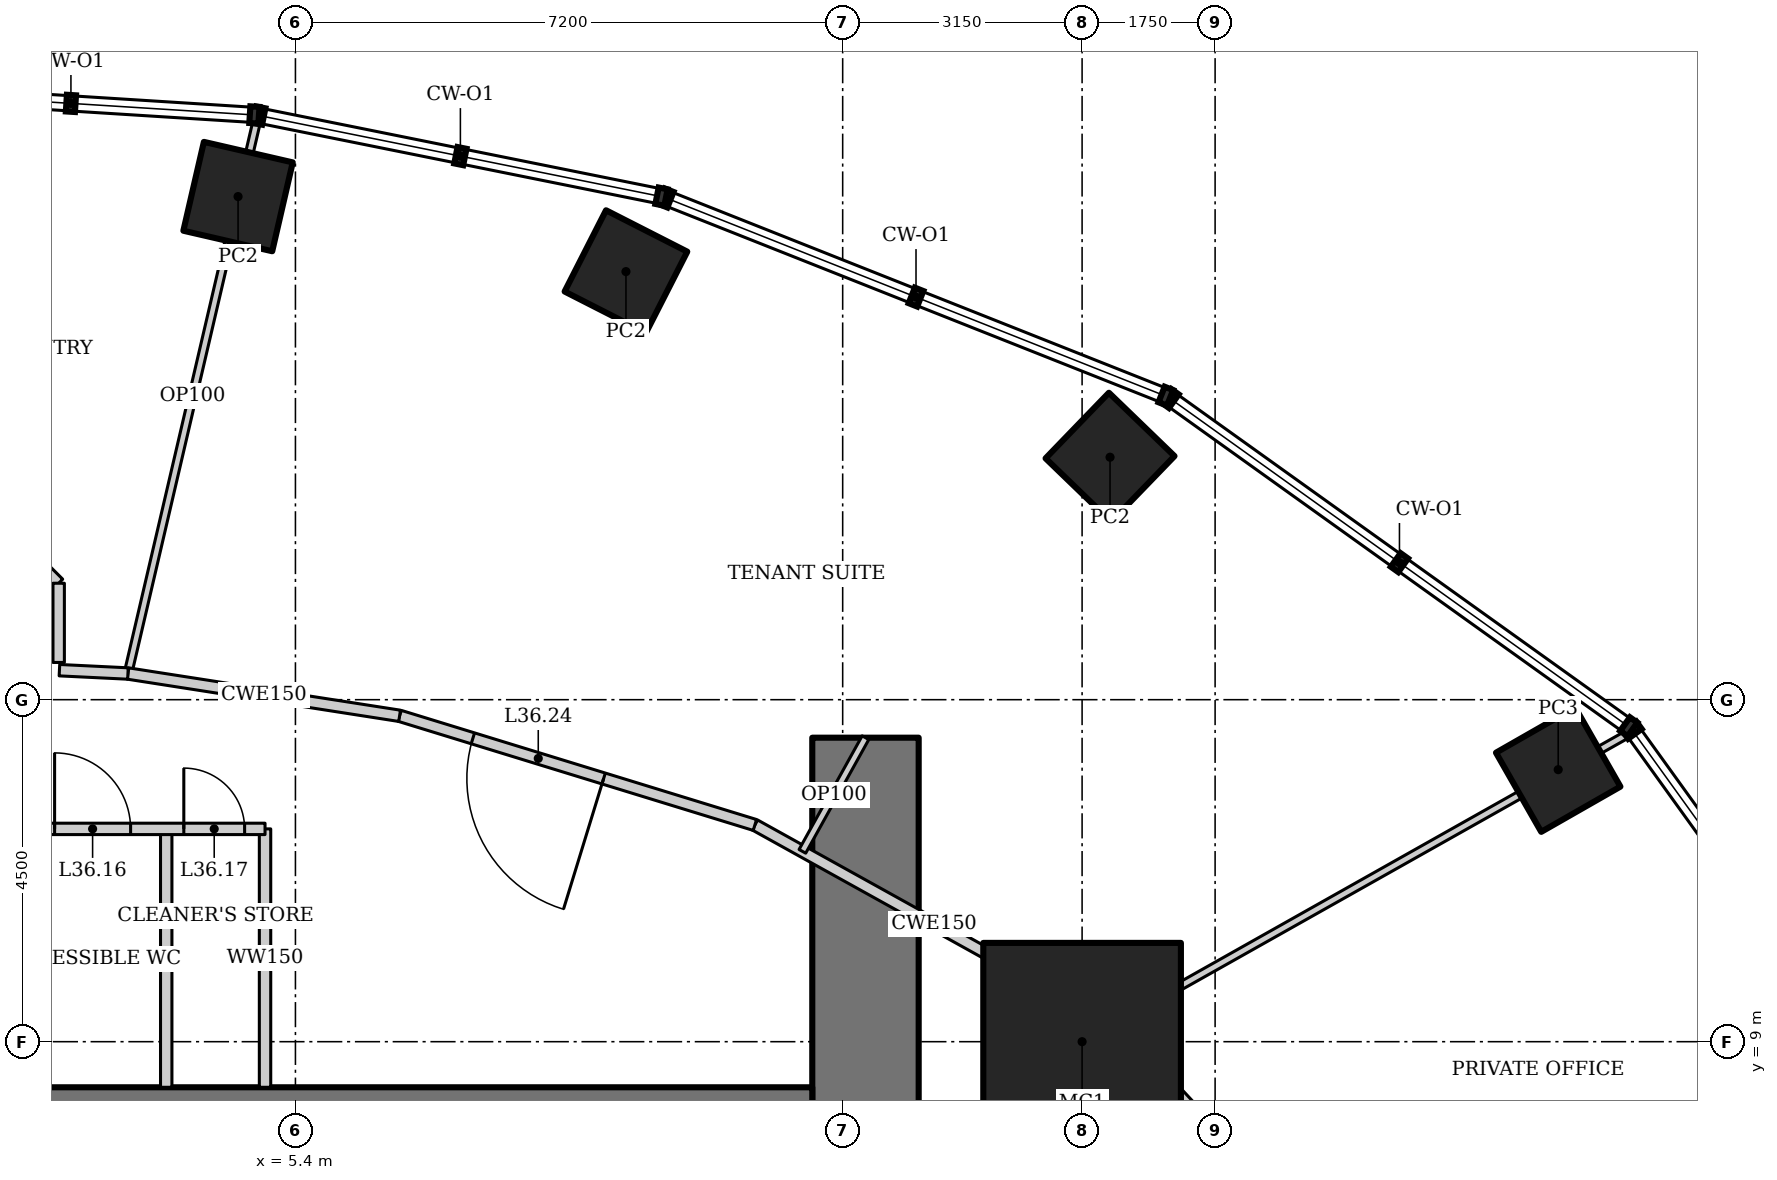
"""IFC4 building model, lengths in metres.
Left out: names, types, materials, properties, quantities, classifications, styles, units other than length and angle.
Written with IfcOpenShell. Run it as: python <this file> out.ifc"""

import sys

from ifc_helpers import new_model, si_unit, direction, frame, frame_2d, origin, origin_2d, place, context, subcontext, project, spatial, rectangle, hollow_rectangle, extrude, element, fill, save


model = new_model("IFC4")
c1 = context("Model", 3, precision=1e-05, world=origin(), true_north=direction((0.0, 1.0)))
c2 = subcontext(c1, "Body", "Model", "MODEL_VIEW")
j1 = project(units=[si_unit("LENGTHUNIT", "METRE"), si_unit("PLANEANGLEUNIT", "RADIAN")], contexts=[c1])
p1 = place(None, origin())
s1 = spatial("IfcSite", under=j1, at=p1, CompositionType="ELEMENT")
p2 = place(p1, origin())
s2 = spatial("IfcBuilding", under=s1, at=p2, CompositionType="ELEMENT")
p3 = place(p2, frame((0.0, 0.0, 155.2)))
s3 = spatial("IfcBuildingStorey", under=s2, at=p3, CompositionType="ELEMENT", Elevation=155.2)
p4 = place(p3, frame((15.75, 9.0, 0.0), z_axis=(0.0, 0.0, 1.0), x_axis=(1.0, 0.0, 0.0)))
e1 = element("IfcColumn", 1, at=p4, inside=s3, PredefinedType="COLUMN", context=c2, shape_type="SweptSolid", body=[
    extrude(hollow_rectangle(XDim=2.6, YDim=2.6, WallThickness=0.13, at=origin_2d()), origin(), (0.0, 0.0, 1.0), 4.2),
])
p5 = place(p3, frame((22.014, 12.579, 0.0), z_axis=(0.0, 0.0, 1.0), x_axis=(0.86824298017, 0.496139221777, 0.0)))
e2 = element("IfcColumn", 2, at=p5, inside=s3, PredefinedType="COLUMN", context=c2, shape_type="SweptSolid", body=[
    extrude(hollow_rectangle(XDim=1.2, YDim=1.2, WallThickness=0.12, at=origin_2d()), origin(), (0.0, 0.0, 1.0), 4.2),
])
for number, where, z_axis, x_axis in (
    (3, (16.118, 16.69, 0.0), (0.0, 0.0, 1.0), (0.695, 0.719, 0.0)),
    (4, (9.749, 19.133, 0.0), (0.0, 0.0, 1.0), (0.454, 0.891, 0.0)),
    (5, (4.645, 20.12, 0.0), (0.0, 0.0, 1.0), (0.225, 0.974, 0.0)),
):
    element("IfcColumn", number, at=place(p3, frame(where, z_axis=z_axis, x_axis=x_axis)), inside=s3, PredefinedType="COLUMN", context=c2, shape_type="SweptSolid", body=[
        extrude(hollow_rectangle(XDim=1.2, YDim=1.2, WallThickness=0.1, at=origin_2d()), origin(), (0.0, 0.0, 1.0), 4.2),
    ])
p6 = place(p3, frame((12.9, -13.0, 0.0), z_axis=(0.0, 0.0, 1.0), x_axis=(0.0, 1.0, 0.0)))
e6 = element("IfcWall", 6, at=p6, inside=s3, PredefinedType="SHEAR", context=c2, shape_type="SweptSolid", body=[
    extrude(rectangle(XDim=26.0, YDim=1.4, at=frame_2d((13.0, 0.0))), origin(), (0.0, 0.0, 1.0), 4.2),
])
p7 = place(p6, frame((12.1, 0.0, 0.0)))
e7 = element("IfcOpeningElement", 7, at=p7, cuts=e6, PredefinedType="OPENING", context=c2, shape_type="SweptSolid", body=[
    extrude(rectangle(XDim=1.8, YDim=2.1, at=frame_2d((0.9, 1.05))), frame((0.0, 0.71, 0.0), z_axis=(0.0, -1.0, 0.0), x_axis=(1.0, 0.0, 0.0)), (0.0, 0.0, 1.0), 1.42),
])
p8 = place(p3, frame((12.2, 7.6, 0.0), z_axis=(0.0, 0.0, 1.0), x_axis=(-1.0, 0.0, 0.0)))
e8 = element("IfcWall", 8, at=p8, inside=s3, PredefinedType="SHEAR", context=c2, shape_type="SweptSolid", body=[
    extrude(rectangle(XDim=24.4, YDim=1.6, at=frame_2d((12.2, 0.0))), origin(), (0.0, 0.0, 1.0), 4.2),
])
p9 = place(p3, frame((22.949, 13.059, 0.0), z_axis=(0.0, 0.0, 1.0), x_axis=(-0.871274989434, -0.490795163777, 0.0)))
e9 = element("IfcWall", 9, at=p9, inside=s3, PredefinedType="PARTITIONING", context=c2, shape_type="SweptSolid", body=[
    extrude(rectangle(XDim=7.792, YDim=0.1, at=frame_2d((3.896, 0.0))), origin(), (0.0, 0.0, 1.0), 3.451),
])
p10 = place(p3, frame((4.897, 21.135, 0.0), z_axis=(0.0, 0.0, 1.0), x_axis=(-0.227181159974, -0.973852514785, 0.0)))
e10 = element("IfcWall", 10, at=p10, inside=s3, PredefinedType="PARTITIONING", context=c2, shape_type="SweptSolid", body=[
    extrude(rectangle(XDim=7.486, YDim=0.1, at=frame_2d((3.743, 0.0))), origin(), (0.0, 0.0, 1.0), 3.293),
])
p11 = place(p3, frame((20.078, 5.006, 0.0), z_axis=(0.0, 0.0, 1.0), x_axis=(-0.679724658223, 0.733467374191, 0.0)))
e11 = element("IfcWall", 11, at=p11, inside=s3, PredefinedType="PARTITIONING", context=c2, shape_type="SweptSolid", body=[
    extrude(rectangle(XDim=5.765, YDim=0.15, at=frame_2d((2.882, 0.0))), origin(), (0.0, 0.0, 1.0), 4.05),
])
p12 = place(p11, frame((0.15, 0.0, 0.0)))
e12 = element("IfcOpeningElement", 12, at=p12, cuts=e11, PredefinedType="OPENING", context=c2, shape_type="SweptSolid", body=[
    extrude(rectangle(XDim=0.9, YDim=2.1, at=frame_2d((0.45, 1.05))), frame((0.0, 0.085, 0.0), z_axis=(0.0, -1.0, 0.0), x_axis=(1.0, 0.0, 0.0)), (0.0, 0.0, 1.0), 0.17),
])
p13 = place(p3, frame((16.16, 9.234, 0.0), z_axis=(0.0, 0.0, 1.0), x_axis=(-0.87433873028, 0.485316169865, 0.0)))
e13 = element("IfcWall", 13, at=p13, inside=s3, PredefinedType="PARTITIONING", context=c2, shape_type="SweptSolid", body=[
    extrude(rectangle(XDim=5.393, YDim=0.15, at=frame_2d((2.696, 0.0))), origin(), (0.0, 0.0, 1.0), 4.05),
])
p14 = place(p3, frame((11.445, 11.852, 0.0), z_axis=(0.0, 0.0, 1.0), x_axis=(-0.955892284323, 0.293717450573, 0.0)))
e14 = element("IfcWall", 14, at=p14, inside=s3, PredefinedType="PARTITIONING", context=c2, shape_type="SweptSolid", body=[
    extrude(rectangle(XDim=4.89, YDim=0.15, at=frame_2d((2.445, 0.0))), origin(), (0.0, 0.0, 1.0), 4.05),
])
p15 = place(p14, frame((2.082, 0.0, 0.0)))
e15 = element("IfcOpeningElement", 15, at=p15, cuts=e14, PredefinedType="OPENING", context=c2, shape_type="SweptSolid", body=[
    extrude(rectangle(XDim=1.8, YDim=2.1, at=frame_2d((0.9, 1.05))), frame((0.0, 0.085, 0.0), z_axis=(0.0, -1.0, 0.0), x_axis=(1.0, 0.0, 0.0)), (0.0, 0.0, 1.0), 0.17),
])
p16 = place(p3, frame((6.771, 13.288, 0.0), z_axis=(0.0, 0.0, 1.0), x_axis=(-0.98808911792, 0.153882731479, 0.0)))
e16 = element("IfcWall", 16, at=p16, inside=s3, PredefinedType="PARTITIONING", context=c2, shape_type="SweptSolid", body=[
    extrude(rectangle(XDim=3.617, YDim=0.15, at=frame_2d((1.809, 0.0))), origin(), (0.0, 0.0, 1.0), 4.05),
])
for number, where, z_axis, x_axis in (
    (17, (5.0, 8.4, 0.0), (0.0, 0.0, 1.0), (0.0, 1.0, 0.0)),
    (18, (3.7, 8.4, 0.0), (0.0, 0.0, 1.0), (0.0, 1.0, 0.0)),
):
    element("IfcWall", number, at=place(p3, frame(where, z_axis=z_axis, x_axis=x_axis)), inside=s3, PredefinedType="SOLIDWALL", context=c2, shape_type="SweptSolid", body=[
        extrude(rectangle(XDim=3.4, YDim=0.15, at=frame_2d((1.7, 0.0))), origin(), (0.0, 0.0, 1.0), 4.05),
    ])
p17 = place(p3, frame((12.9, 13.0, 0.0), z_axis=(0.0, 0.0, 1.0), x_axis=(-0.485339901234, -0.87432555737, 0.0)))
e19 = element("IfcWall", 19, at=p17, inside=s3, PredefinedType="PARTITIONING", context=c2, shape_type="SweptSolid", body=[
    extrude(rectangle(XDim=1.71, YDim=0.1, at=frame_2d((0.855, 0.0))), origin(), (0.0, 0.0, 1.0), 4.05),
])
p18 = place(p3, frame((3.196, 13.844, 0.0), z_axis=(0.0, 0.0, 1.0), x_axis=(-0.998826757305, 0.048426324366, 0.0)))
e20 = element("IfcWall", 20, at=p18, inside=s3, PredefinedType="PARTITIONING", context=c2, shape_type="SweptSolid", body=[
    extrude(rectangle(XDim=0.902, YDim=0.15, at=frame_2d((0.451, 0.0))), origin(), (0.0, 0.0, 1.0), 4.05),
])
p19 = place(p3, frame((2.131, 11.8, 0.0), z_axis=(0.0, 0.0, 1.0), x_axis=(1.0, 0.0, 0.0)))
e21 = element("IfcWall", 21, at=p19, inside=s3, PredefinedType="SOLIDWALL", context=c2, shape_type="SweptSolid", body=[
    extrude(rectangle(XDim=2.869, YDim=0.15, at=frame_2d((1.434, 0.0))), origin(), (0.0, 0.0, 1.0), 4.05),
])
p20 = place(p19, frame((0.1, 0.0, 0.0)))
e22 = element("IfcOpeningElement", 22, at=p20, cuts=e21, PredefinedType="OPENING", context=c2, shape_type="SweptSolid", body=[
    extrude(rectangle(XDim=1.0, YDim=2.1, at=frame_2d((0.5, 1.05))), frame((0.0, 0.085, 0.0), z_axis=(0.0, -1.0, 0.0), x_axis=(1.0, 0.0, 0.0)), (0.0, 0.0, 1.0), 0.17),
])
p21 = place(p19, frame((1.8, 0.0, 0.0)))
e23 = element("IfcOpeningElement", 23, at=p21, cuts=e21, PredefinedType="OPENING", context=c2, shape_type="SweptSolid", body=[
    extrude(rectangle(XDim=0.8, YDim=2.1, at=frame_2d((0.4, 1.05))), frame((0.0, 0.085, 0.0), z_axis=(0.0, -1.0, 0.0), x_axis=(1.0, 0.0, 0.0)), (0.0, 0.0, 1.0), 0.17),
])
p22 = place(p3, frame((1.532, 15.785, 0.0), z_axis=(0.0, 0.0, 1.0), x_axis=(0.707106781187, -0.707106781187, 0.0)))
e24 = element("IfcWall", 24, at=p22, inside=s3, PredefinedType="PARTITIONING", context=c2, shape_type="SweptSolid", body=[
    extrude(rectangle(XDim=1.064, YDim=0.15, at=frame_2d((0.532, 0.0))), origin(), (0.0, 0.0, 1.0), 4.05),
])
p23 = place(p3, frame((2.285, 15.032, 0.0), z_axis=(0.0, 0.0, 1.0), x_axis=(0.0, -1.0, 0.0)))
e25 = element("IfcWall", 25, at=p23, inside=s3, PredefinedType="PARTITIONING", context=c2, shape_type="SweptSolid", body=[
    extrude(rectangle(XDim=1.042, YDim=0.15, at=frame_2d((0.521, 0.0))), origin(), (0.0, 0.0, 1.0), 4.05),
])
p24 = place(p20, origin())
e26 = element("IfcDoor", 26, at=p24, inside=s3, OperationType="SINGLE_SWING_LEFT", PredefinedType="DOOR", context=c2, shape_type="SweptSolid", body=[
    extrude(rectangle(XDim=1.0, YDim=2.1, at=frame_2d((0.5, 1.05))), frame((0.0, 0.025, 0.0), z_axis=(0.0, -1.0, 0.0), x_axis=(1.0, 0.0, 0.0)), (0.0, 0.0, 1.0), 0.05),
])
fill(e22, e26)
p25 = place(p21, origin())
e27 = element("IfcDoor", 27, at=p25, inside=s3, OperationType="SINGLE_SWING_LEFT", PredefinedType="DOOR", context=c2, shape_type="SweptSolid", body=[
    extrude(rectangle(XDim=0.8, YDim=2.1, at=frame_2d((0.4, 1.05))), frame((0.0, 0.025, 0.0), z_axis=(0.0, -1.0, 0.0), x_axis=(1.0, 0.0, 0.0)), (0.0, 0.0, 1.0), 0.05),
])
fill(e23, e27)
p26 = place(p15, origin())
e28 = element("IfcDoor", 28, at=p26, inside=s3, OperationType="DOUBLE_DOOR_DOUBLE_SWING", PredefinedType="DOOR", context=c2, shape_type="SweptSolid", body=[
    extrude(rectangle(XDim=1.8, YDim=2.1, at=frame_2d((0.9, 1.05))), frame((0.0, 0.025, 0.0), z_axis=(0.0, -1.0, 0.0), x_axis=(1.0, 0.0, 0.0)), (0.0, 0.0, 1.0), 0.05),
])
fill(e15, e28)
save(model, sys.argv[1])
